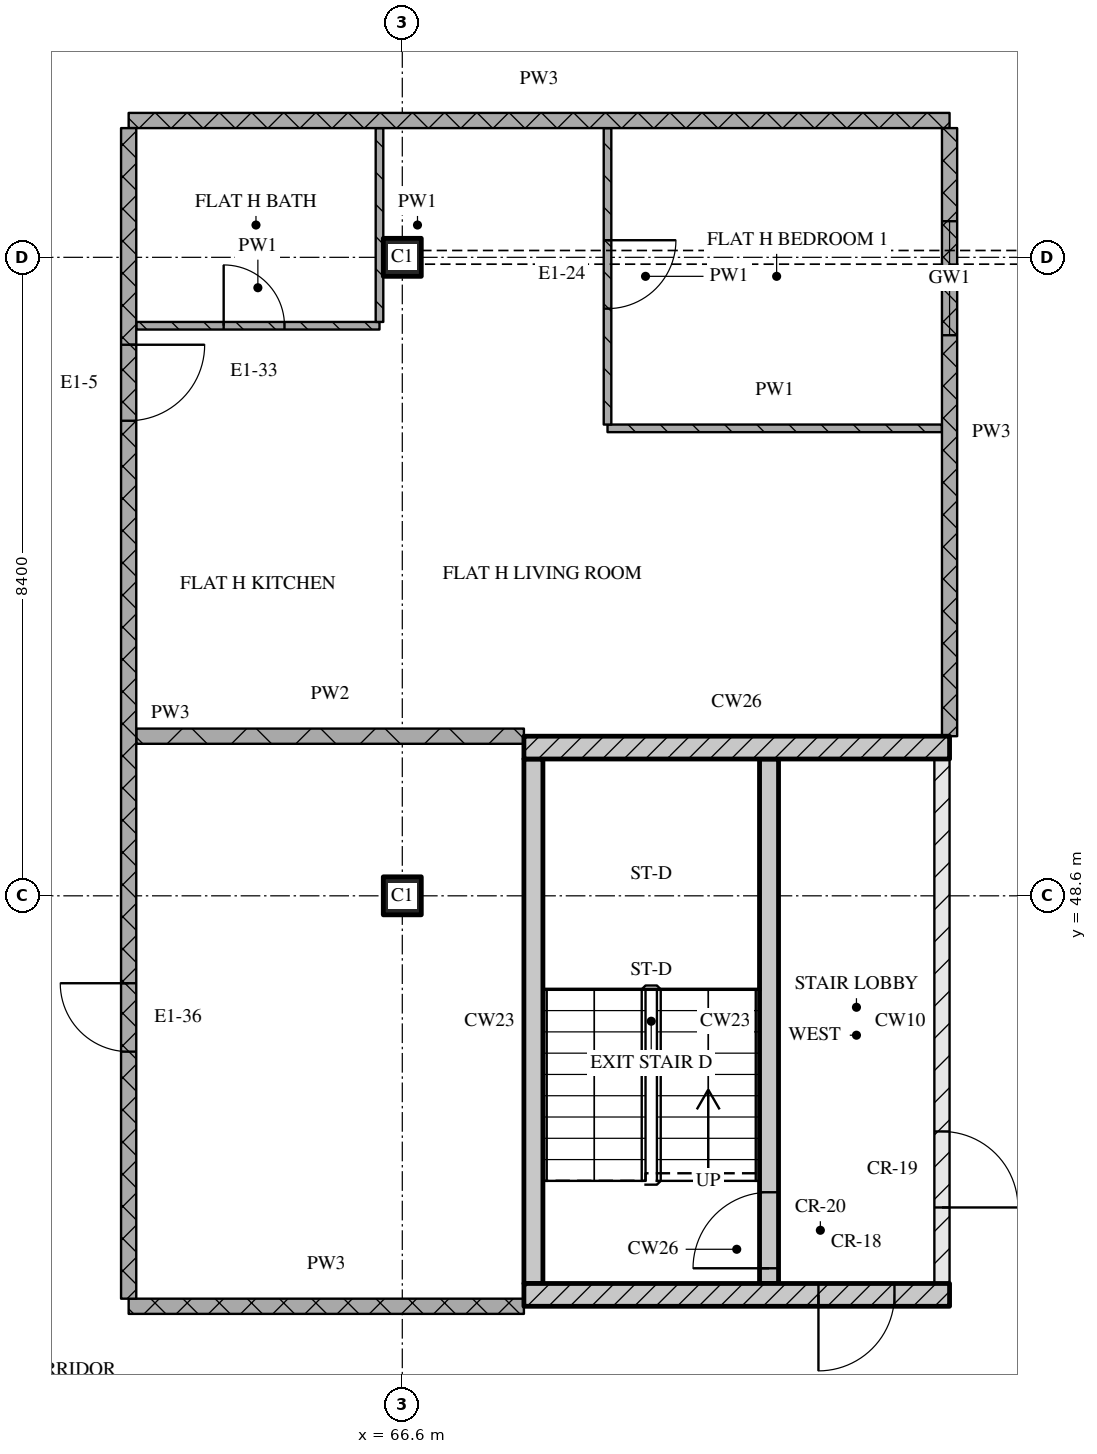
"""IFC4 building model, lengths in metres.
Left out: names, types, materials, properties, quantities, classifications, styles, units other than length and angle.
Written with IfcOpenShell. Run it as: python <this file> out.ifc"""

import sys

from ifc_helpers import new_model, si_unit, direction, frame, frame_2d, origin, origin_2d, place, context, subcontext, project, spatial, rectangle, extrude, element, fill, save


model = new_model("IFC4")
c1 = context("Model", 3, precision=1e-05, world=origin(), true_north=direction((0.0, 1.0)))
c2 = subcontext(c1, "Body", "Model", "MODEL_VIEW")
j1 = project(units=[si_unit("LENGTHUNIT", "METRE"), si_unit("PLANEANGLEUNIT", "RADIAN")], contexts=[c1])
p1 = place(None, origin())
s1 = spatial("IfcSite", under=j1, at=p1, CompositionType="ELEMENT")
p2 = place(p1, origin())
s2 = spatial("IfcBuilding", under=s1, at=p2, CompositionType="ELEMENT")
p3 = place(p2, frame((0.0, 0.0, 263.55)))
s3 = spatial("IfcBuildingStorey", under=s2, at=p3, CompositionType="ELEMENT", Elevation=263.55)
for number, where, z_axis, x_axis in (
    (1, (66.6, 48.6, 0.0), (0.0, 0.0, 1.0), (1.0, 0.0, 0.0)),
    (2, (66.6, 57.0, 0.0), (0.0, 0.0, 1.0), (1.0, 0.0, 0.0)),
):
    element("IfcColumn", number, at=place(p3, frame(where, z_axis=z_axis, x_axis=x_axis)), inside=s3, PredefinedType="COLUMN", context=c2, shape_type="SweptSolid", body=[
        extrude(rectangle(XDim=0.5, YDim=0.5, at=origin_2d()), origin(), (0.0, 0.0, 1.0), 3.6),
    ])
p4 = place(p3, frame((68.2, 43.35, 0.0), z_axis=(0.0, 0.0, 1.0), x_axis=(1.0, 0.0, 0.0)))
e3 = element("IfcWall", 3, at=p4, inside=s3, PredefinedType="SOLIDWALL", context=c2, shape_type="SweptSolid", body=[
    extrude(rectangle(XDim=5.6, YDim=0.3, at=frame_2d((2.8, 0.0))), origin(), (0.0, 0.0, 1.0), 3.32),
])
p5 = place(p4, frame((3.875, 0.0, 0.0)))
e4 = element("IfcOpeningElement", 4, at=p5, cuts=e3, PredefinedType="OPENING", context=c2, shape_type="SweptSolid", body=[
    extrude(rectangle(XDim=1.0, YDim=2.1, at=frame_2d((0.5, 1.05))), frame((0.0, 0.16, 0.0), z_axis=(0.0, -1.0, 0.0), x_axis=(1.0, 0.0, 0.0)), (0.0, 0.0, 1.0), 0.32),
])
p6 = place(p3, frame((68.325, 43.5, 0.0), z_axis=(0.0, 0.0, 1.0), x_axis=(0.0, 1.0, 0.0)))
e5 = element("IfcWall", 5, at=p6, inside=s3, PredefinedType="SOLIDWALL", context=c2, shape_type="SweptSolid", body=[
    extrude(rectangle(XDim=6.9, YDim=0.25, at=frame_2d((3.45, 0.0))), origin(), (0.0, 0.0, 1.0), 3.32),
])
p7 = place(p3, frame((71.425, 43.5, 0.0), z_axis=(0.0, 0.0, 1.0), x_axis=(0.0, 1.0, 0.0)))
e6 = element("IfcWall", 6, at=p7, inside=s3, PredefinedType="SOLIDWALL", context=c2, shape_type="SweptSolid", body=[
    extrude(rectangle(XDim=6.9, YDim=0.25, at=frame_2d((3.45, 0.0))), origin(), (0.0, 0.0, 1.0), 3.32),
])
p8 = place(p7, frame((0.2, 0.0, 0.0)))
e7 = element("IfcOpeningElement", 7, at=p8, cuts=e6, PredefinedType="OPENING", context=c2, shape_type="SweptSolid", body=[
    extrude(rectangle(XDim=1.0, YDim=2.1, at=frame_2d((0.5, 1.05))), frame((0.0, 0.135, 0.0), z_axis=(0.0, -1.0, 0.0), x_axis=(1.0, 0.0, 0.0)), (0.0, 0.0, 1.0), 0.27),
])
p9 = place(p3, frame((73.7, 43.5, 0.0), z_axis=(0.0, 0.0, 1.0), x_axis=(0.0, 1.0, 0.0)))
e8 = element("IfcWall", 8, at=p9, inside=s3, PredefinedType="PARTITIONING", context=c2, shape_type="SweptSolid", body=[
    extrude(rectangle(XDim=6.9, YDim=0.2, at=frame_2d((3.45, 0.0))), origin(), (0.0, 0.0, 1.0), 3.32),
])
p10 = place(p9, frame((1.0, 0.0, 0.0)))
e9 = element("IfcOpeningElement", 9, at=p10, cuts=e8, PredefinedType="OPENING", context=c2, shape_type="SweptSolid", body=[
    extrude(rectangle(XDim=1.0, YDim=2.1, at=frame_2d((0.5, 1.05))), frame((0.0, 0.11, 0.0), z_axis=(0.0, -1.0, 0.0), x_axis=(1.0, 0.0, 0.0)), (0.0, 0.0, 1.0), 0.22),
])
p11 = place(p3, frame((68.2, 50.55, 0.0), z_axis=(0.0, 0.0, 1.0), x_axis=(1.0, 0.0, 0.0)))
e10 = element("IfcWall", 10, at=p11, inside=s3, PredefinedType="SOLIDWALL", context=c2, shape_type="SweptSolid", body=[
    extrude(rectangle(XDim=5.6, YDim=0.3, at=frame_2d((2.8, 0.0))), origin(), (0.0, 0.0, 1.0), 3.32),
])
p12 = place(p3, frame((63.0, 43.2, 0.0), z_axis=(0.0, 0.0, 1.0), x_axis=(1.0, 0.0, 0.0)))
e11 = element("IfcWall", 11, at=p12, inside=s3, PredefinedType="PARTITIONING", context=c2, shape_type="SweptSolid", body=[
    extrude(rectangle(XDim=5.2, YDim=0.2, at=frame_2d((2.6, 0.0))), origin(), (0.0, 0.0, 1.0), 3.32),
])
p13 = place(p3, frame((63.1, 50.7, 0.0), z_axis=(0.0, 0.0, 1.0), x_axis=(1.0, 0.0, 0.0)))
e12 = element("IfcWall", 12, at=p13, inside=s3, PredefinedType="PARTITIONING", context=c2, shape_type="SweptSolid", body=[
    extrude(rectangle(XDim=5.1, YDim=0.2, at=frame_2d((2.55, 0.0))), origin(), (0.0, 0.0, 1.0), 3.32),
])
p14 = place(p3, frame((69.3, 54.75, 0.0), z_axis=(0.0, 0.0, 1.0), x_axis=(1.0, 0.0, 0.0)))
e13 = element("IfcWall", 13, at=p14, inside=s3, PredefinedType="PARTITIONING", context=c2, shape_type="SweptSolid", body=[
    extrude(rectangle(XDim=4.4, YDim=0.1, at=frame_2d((2.2, 0.0))), origin(), (0.0, 0.0, 1.0), 3.32),
])
p15 = place(p3, frame((63.1, 56.1, 0.0), z_axis=(0.0, 0.0, 1.0), x_axis=(1.0, 0.0, 0.0)))
e14 = element("IfcWall", 14, at=p15, inside=s3, PredefinedType="PARTITIONING", context=c2, shape_type="SweptSolid", body=[
    extrude(rectangle(XDim=3.2, YDim=0.1, at=frame_2d((1.6, 0.0))), origin(), (0.0, 0.0, 1.0), 3.32),
])
p16 = place(p15, frame((1.15, 0.0, 0.0)))
e15 = element("IfcOpeningElement", 15, at=p16, cuts=e14, PredefinedType="OPENING", context=c2, shape_type="SweptSolid", body=[
    extrude(rectangle(XDim=0.8, YDim=2.1, at=frame_2d((0.4, 1.05))), frame((0.0, 0.06, 0.0), z_axis=(0.0, -1.0, 0.0), x_axis=(1.0, 0.0, 0.0)), (0.0, 0.0, 1.0), 0.12),
])
p17 = place(p3, frame((63.0, 58.8, 0.0), z_axis=(0.0, 0.0, 1.0), x_axis=(1.0, 0.0, 0.0)))
e16 = element("IfcWall", 16, at=p17, inside=s3, PredefinedType="PARTITIONING", context=c2, shape_type="SweptSolid", body=[
    extrude(rectangle(XDim=10.8, YDim=0.2, at=frame_2d((5.4, 0.0))), origin(), (0.0, 0.0, 1.0), 3.32),
])
p18 = place(p3, frame((63.0, 58.7, 0.0), z_axis=(0.0, 0.0, 1.0), x_axis=(0.0, -1.0, 0.0)))
e17 = element("IfcWall", 17, at=p18, inside=s3, PredefinedType="PARTITIONING", context=c2, shape_type="SweptSolid", body=[
    extrude(rectangle(XDim=15.4, YDim=0.2, at=frame_2d((7.7, 0.0))), origin(), (0.0, 0.0, 1.0), 3.32),
])
p19 = place(p18, frame((2.85, 0.0, 0.0)))
e18 = element("IfcOpeningElement", 18, at=p19, cuts=e17, PredefinedType="OPENING", context=c2, shape_type="SweptSolid", body=[
    extrude(rectangle(XDim=1.0, YDim=2.1, at=frame_2d((0.5, 1.05))), frame((0.0, 0.11, 0.0), z_axis=(0.0, -1.0, 0.0), x_axis=(1.0, 0.0, 0.0)), (0.0, 0.0, 1.0), 0.22),
])
p20 = place(p18, frame((11.25, 0.0, 0.0)))
e19 = element("IfcOpeningElement", 19, at=p20, cuts=e17, PredefinedType="OPENING", context=c2, shape_type="SweptSolid", body=[
    extrude(rectangle(XDim=0.9, YDim=2.1, at=frame_2d((0.45, 1.05))), frame((0.0, 0.11, 0.0), z_axis=(0.0, -1.0, 0.0), x_axis=(1.0, 0.0, 0.0)), (0.0, 0.0, 1.0), 0.22),
])
p21 = place(p3, frame((66.3, 58.7, 0.0), z_axis=(0.0, 0.0, 1.0), x_axis=(0.0, -1.0, 0.0)))
e20 = element("IfcWall", 20, at=p21, inside=s3, PredefinedType="PARTITIONING", context=c2, shape_type="SweptSolid", body=[
    extrude(rectangle(XDim=2.55, YDim=0.1, at=frame_2d((1.275, 0.0))), origin(), (0.0, 0.0, 1.0), 3.32),
])
p22 = place(p3, frame((69.3, 58.7, 0.0), z_axis=(0.0, 0.0, 1.0), x_axis=(0.0, -1.0, 0.0)))
e21 = element("IfcWall", 21, at=p22, inside=s3, PredefinedType="PARTITIONING", context=c2, shape_type="SweptSolid", body=[
    extrude(rectangle(XDim=3.9, YDim=0.1, at=frame_2d((1.95, 0.0))), origin(), (0.0, 0.0, 1.0), 3.32),
])
p23 = place(p22, frame((1.475, 0.0, 0.0)))
e22 = element("IfcOpeningElement", 22, at=p23, cuts=e21, PredefinedType="OPENING", context=c2, shape_type="SweptSolid", body=[
    extrude(rectangle(XDim=0.9, YDim=2.1, at=frame_2d((0.45, 1.05))), frame((0.0, 0.06, 0.0), z_axis=(0.0, -1.0, 0.0), x_axis=(1.0, 0.0, 0.0)), (0.0, 0.0, 1.0), 0.12),
])
p24 = place(p3, frame((73.8, 58.7, 0.0), z_axis=(0.0, 0.0, 1.0), x_axis=(0.0, -1.0, 0.0)))
e23 = element("IfcWall", 23, at=p24, inside=s3, PredefinedType="PARTITIONING", context=c2, shape_type="SweptSolid", body=[
    extrude(rectangle(XDim=8.0, YDim=0.2, at=frame_2d((4.0, 0.0))), origin(), (0.0, 0.0, 1.0), 3.32),
])
p25 = place(p24, frame((1.225, 0.0, 0.9)))
e24 = element("IfcOpeningElement", 24, at=p25, cuts=e23, PredefinedType="OPENING", context=c2, shape_type="SweptSolid", body=[
    extrude(rectangle(XDim=1.5, YDim=1.5, at=frame_2d((0.75, 0.75))), frame((0.0, 0.11, 0.0), z_axis=(0.0, -1.0, 0.0), x_axis=(1.0, 0.0, 0.0)), (0.0, 0.0, 1.0), 0.22),
])
p26 = place(p5, origin())
e25 = element("IfcDoor", 25, at=p26, inside=s3, OperationType="SINGLE_SWING_RIGHT", PredefinedType="DOOR", context=c2, shape_type="SweptSolid", body=[
    extrude(rectangle(XDim=1.0, YDim=2.1, at=frame_2d((0.5, 1.05))), frame((0.0, 0.025, 0.0), z_axis=(0.0, -1.0, 0.0), x_axis=(1.0, 0.0, 0.0)), (0.0, 0.0, 1.0), 0.05),
])
fill(e4, e25)
p27 = place(p8, origin())
e26 = element("IfcDoor", 26, at=p27, inside=s3, OperationType="SINGLE_SWING_LEFT", PredefinedType="DOOR", context=c2, shape_type="SweptSolid", body=[
    extrude(rectangle(XDim=1.0, YDim=2.1, at=frame_2d((0.5, 1.05))), frame((0.0, 0.025, 0.0), z_axis=(0.0, -1.0, 0.0), x_axis=(1.0, 0.0, 0.0)), (0.0, 0.0, 1.0), 0.05),
])
fill(e7, e26)
p28 = place(p10, origin())
e27 = element("IfcDoor", 27, at=p28, inside=s3, OperationType="SINGLE_SWING_RIGHT", PredefinedType="DOOR", context=c2, shape_type="SweptSolid", body=[
    extrude(rectangle(XDim=1.0, YDim=2.1, at=frame_2d((0.5, 1.05))), frame((0.0, 0.025, 0.0), z_axis=(0.0, -1.0, 0.0), x_axis=(1.0, 0.0, 0.0)), (0.0, 0.0, 1.0), 0.05),
])
fill(e9, e27)
p29 = place(p16, origin())
e28 = element("IfcDoor", 28, at=p29, inside=s3, OperationType="SINGLE_SWING_LEFT", PredefinedType="DOOR", context=c2, shape_type="SweptSolid", body=[
    extrude(rectangle(XDim=0.8, YDim=2.1, at=frame_2d((0.4, 1.05))), frame((0.0, 0.025, 0.0), z_axis=(0.0, -1.0, 0.0), x_axis=(1.0, 0.0, 0.0)), (0.0, 0.0, 1.0), 0.05),
])
fill(e15, e28)
p30 = place(p19, origin())
e29 = element("IfcDoor", 29, at=p30, inside=s3, OperationType="SINGLE_SWING_LEFT", PredefinedType="DOOR", context=c2, shape_type="SweptSolid", body=[
    extrude(rectangle(XDim=1.0, YDim=2.1, at=frame_2d((0.5, 1.05))), frame((0.0, 0.025, 0.0), z_axis=(0.0, -1.0, 0.0), x_axis=(1.0, 0.0, 0.0)), (0.0, 0.0, 1.0), 0.05),
])
fill(e18, e29)
p31 = place(p20, origin())
e30 = element("IfcDoor", 30, at=p31, inside=s3, OperationType="SINGLE_SWING_RIGHT", PredefinedType="DOOR", context=c2, shape_type="SweptSolid", body=[
    extrude(rectangle(XDim=0.9, YDim=2.1, at=frame_2d((0.45, 1.05))), frame((0.0, 0.025, 0.0), z_axis=(0.0, -1.0, 0.0), x_axis=(1.0, 0.0, 0.0)), (0.0, 0.0, 1.0), 0.05),
])
fill(e19, e30)
p32 = place(p23, origin())
e31 = element("IfcDoor", 31, at=p32, inside=s3, OperationType="SINGLE_SWING_LEFT", PredefinedType="DOOR", context=c2, shape_type="SweptSolid", body=[
    extrude(rectangle(XDim=0.9, YDim=2.1, at=frame_2d((0.45, 1.05))), frame((0.0, 0.025, 0.0), z_axis=(0.0, -1.0, 0.0), x_axis=(1.0, 0.0, 0.0)), (0.0, 0.0, 1.0), 0.05),
])
fill(e22, e31)
p33 = place(p25, origin())
e32 = element("IfcWindow", 32, at=p33, inside=s3, PartitioningType="SINGLE_PANEL", PredefinedType="WINDOW", context=c2, shape_type="SweptSolid", body=[
    extrude(rectangle(XDim=1.5, YDim=1.5, at=frame_2d((0.75, 0.75))), frame((0.0, 0.03, 0.0), z_axis=(0.0, -1.0, 0.0), x_axis=(1.0, 0.0, 0.0)), (0.0, 0.0, 1.0), 0.06),
])
fill(e24, e32)
save(model, sys.argv[1])
